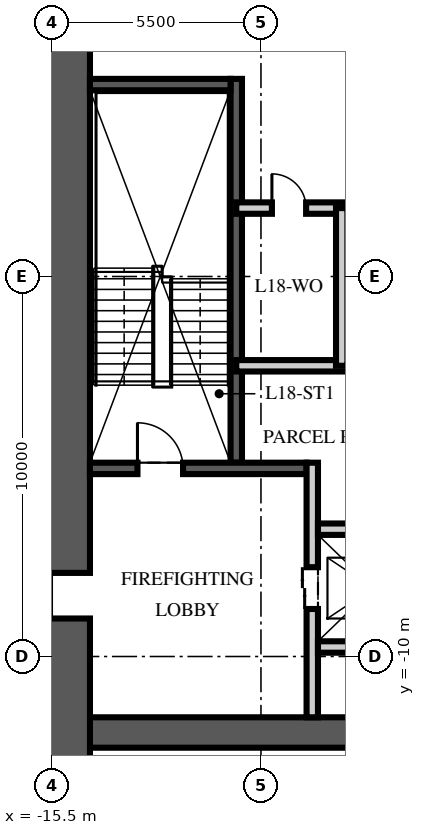
"""IFC4 building model, lengths in metres.
Left out: names, types, materials, properties, quantities, classifications, styles, units other than length and angle.
Written with IfcOpenShell. Run it as: python <this file> out.ifc"""

import sys

from ifc_helpers import new_model, si_unit, direction, frame, frame_2d, origin, place, context, subcontext, project, spatial, rectangle, extrude, element, fill, save


model = new_model("IFC4")
c1 = context("Model", 3, precision=1e-05, world=origin(), true_north=direction((0.0, 1.0)))
c2 = subcontext(c1, "Body", "Model", "MODEL_VIEW")
j1 = project(units=[si_unit("LENGTHUNIT", "METRE"), si_unit("PLANEANGLEUNIT", "RADIAN")], contexts=[c1])
p1 = place(None, origin())
s1 = spatial("IfcSite", under=j1, at=p1, CompositionType="ELEMENT")
p2 = place(p1, origin())
s2 = spatial("IfcBuilding", under=s1, at=p2, CompositionType="ELEMENT")
p3 = place(p2, frame((0.0, 0.0, 73.5)))
s3 = spatial("IfcBuildingStorey", under=s2, at=p3, CompositionType="ELEMENT", Elevation=73.5)
p4 = place(p3, frame((-15.5, -12.0, -0.25), z_axis=(0.0, 0.0, 1.0), x_axis=(1.0, 0.0, 0.0)))
e1 = element("IfcWall", 1, at=p4, inside=s3, PredefinedType="SHEAR", context=c2, shape_type="SweptSolid", body=[
    extrude(rectangle(XDim=31.0, YDim=0.8, at=frame_2d((15.5, 0.0))), origin(), (0.0, 0.0, 1.0), 3.75),
])
p5 = place(p3, frame((-15.5, -15.5, -0.25), z_axis=(0.0, 0.0, 1.0), x_axis=(0.0, 1.0, 0.0)))
e2 = element("IfcWall", 2, at=p5, inside=s3, PredefinedType="SHEAR", context=c2, shape_type="SweptSolid", body=[
    extrude(rectangle(XDim=31.0, YDim=2.0, at=frame_2d((15.5, 0.0))), origin(), (0.0, 0.0, 1.0), 3.75),
])
p6 = place(p5, frame((6.5, 0.0, 0.25)))
e3 = element("IfcOpeningElement", 3, at=p6, cuts=e2, PredefinedType="OPENING", context=c2, shape_type="SweptSolid", body=[
    extrude(rectangle(XDim=1.2, YDim=2.1, at=frame_2d((0.6, 1.05))), frame((0.0, 1.01, 0.0), z_axis=(0.0, -1.0, 0.0), x_axis=(1.0, 0.0, 0.0)), (0.0, 0.0, 1.0), 2.02),
])
p7 = place(p5, frame((23.0, 0.0, 0.25)))
e4 = element("IfcOpeningElement", 4, at=p7, cuts=e2, PredefinedType="OPENING", context=c2, shape_type="SweptSolid", body=[
    extrude(rectangle(XDim=1.8, YDim=2.1, at=frame_2d((0.9, 1.05))), frame((0.0, 1.01, 0.0), z_axis=(0.0, -1.0, 0.0), x_axis=(1.0, 0.0, 0.0)), (0.0, 0.0, 1.0), 2.02),
])
p8 = place(p3, frame((-10.65, -4.9, 0.0), z_axis=(0.0, 0.0, 1.0), x_axis=(0.0, 1.0, 0.0)))
e5 = element("IfcWall", 5, at=p8, inside=s3, PredefinedType="SOLIDWALL", context=c2, shape_type="SweptSolid", body=[
    extrude(rectangle(XDim=10.1, YDim=0.3, at=frame_2d((5.05, 0.0))), origin(), (0.0, 0.0, 1.0), 3.5),
])
p9 = place(p3, frame((-14.5, -5.05, 0.0), z_axis=(0.0, 0.0, 1.0), x_axis=(1.0, 0.0, 0.0)))
e6 = element("IfcWall", 6, at=p9, inside=s3, PredefinedType="SOLIDWALL", context=c2, shape_type="SweptSolid", body=[
    extrude(rectangle(XDim=5.7, YDim=0.3, at=frame_2d((2.85, 0.0))), origin(), (0.0, 0.0, 1.0), 3.5),
])
p10 = place(p9, frame((1.25, 0.0, 0.0)))
e7 = element("IfcOpeningElement", 7, at=p10, cuts=e6, PredefinedType="OPENING", context=c2, shape_type="SweptSolid", body=[
    extrude(rectangle(XDim=1.2, YDim=2.1, at=frame_2d((0.6, 1.05))), frame((0.0, 0.16, 0.0), z_axis=(0.0, -1.0, 0.0), x_axis=(1.0, 0.0, 0.0)), (0.0, 0.0, 1.0), 0.32),
])
p11 = place(p3, frame((-14.5, 5.05, 0.0), z_axis=(0.0, 0.0, 1.0), x_axis=(1.0, 0.0, 0.0)))
e8 = element("IfcWall", 8, at=p11, inside=s3, PredefinedType="SOLIDWALL", context=c2, shape_type="SweptSolid", body=[
    extrude(rectangle(XDim=3.7, YDim=0.3, at=frame_2d((1.85, 0.0))), origin(), (0.0, 0.0, 1.0), 3.5),
])
p12 = place(p3, frame((-8.65, -11.6, 0.0), z_axis=(0.0, 0.0, 1.0), x_axis=(0.0, 1.0, 0.0)))
e9 = element("IfcWall", 9, at=p12, inside=s3, PredefinedType="PARTITIONING", context=c2, shape_type="SweptSolid", body=[
    extrude(rectangle(XDim=6.7, YDim=0.3, at=frame_2d((3.35, 0.0))), origin(), (0.0, 0.0, 1.0), 3.5),
])
p13 = place(p12, frame((2.85, 0.0, 0.0)))
e10 = element("IfcOpeningElement", 10, at=p13, cuts=e9, PredefinedType="OPENING", context=c2, shape_type="SweptSolid", body=[
    extrude(rectangle(XDim=1.1, YDim=2.1, at=frame_2d((0.55, 1.05))), frame((0.0, 0.16, 0.0), z_axis=(0.0, -1.0, 0.0), x_axis=(1.0, 0.0, 0.0)), (0.0, 0.0, 1.0), 0.32),
])
p14 = place(p3, frame((-8.5, -6.65, 0.0), z_axis=(0.0, 0.0, 1.0), x_axis=(1.0, 0.0, 0.0)))
e11 = element("IfcWall", 11, at=p14, inside=s3, PredefinedType="PARTITIONING", context=c2, shape_type="SweptSolid", body=[
    extrude(rectangle(XDim=17.0, YDim=0.3, at=frame_2d((8.5, 0.0))), origin(), (0.0, 0.0, 1.0), 3.5),
])
p15 = place(p14, frame((7.8, 0.0, 0.0)))
e12 = element("IfcOpeningElement", 12, at=p15, cuts=e11, PredefinedType="OPENING", context=c2, shape_type="SweptSolid", body=[
    extrude(rectangle(XDim=1.3, YDim=2.4, at=frame_2d((0.65, 1.2))), frame((0.0, 0.16, 0.0), z_axis=(0.0, -1.0, 0.0), x_axis=(1.0, 0.0, 0.0)), (0.0, 0.0, 1.0), 0.32),
])
p16 = place(p14, frame((5.65, 0.0, 0.0)))
e13 = element("IfcOpeningElement", 13, at=p16, cuts=e11, PredefinedType="OPENING", context=c2, shape_type="SweptSolid", body=[
    extrude(rectangle(XDim=0.9, YDim=2.1, at=frame_2d((0.45, 1.05))), frame((0.0, 0.16, 0.0), z_axis=(0.0, -1.0, 0.0), x_axis=(1.0, 0.0, 0.0)), (0.0, 0.0, 1.0), 0.32),
])
p17 = place(p14, frame((10.4, 0.0, 0.0)))
e14 = element("IfcOpeningElement", 14, at=p17, cuts=e11, PredefinedType="OPENING", context=c2, shape_type="SweptSolid", body=[
    extrude(rectangle(XDim=0.9, YDim=2.1, at=frame_2d((0.45, 1.05))), frame((0.0, 0.16, 0.0), z_axis=(0.0, -1.0, 0.0), x_axis=(1.0, 0.0, 0.0)), (0.0, 0.0, 1.0), 0.32),
])
p18 = place(p3, frame((-8.5, -9.75, 0.0), z_axis=(0.0, 0.0, 1.0), x_axis=(1.0, 0.0, 0.0)))
e15 = element("IfcWall", 15, at=p18, inside=s3, PredefinedType="PARTITIONING", context=c2, shape_type="SweptSolid", body=[
    extrude(rectangle(XDim=2.9, YDim=0.3, at=frame_2d((1.45, 0.0))), origin(), (0.0, 0.0, 1.0), 3.5),
])
p19 = place(p3, frame((-10.65, 1.8, 0.0), z_axis=(0.0, 0.0, 1.0), x_axis=(1.0, 0.0, 0.0)))
e16 = element("IfcWall", 16, at=p19, inside=s3, PredefinedType="PARTITIONING", context=c2, shape_type="SweptSolid", body=[
    extrude(rectangle(XDim=21.3, YDim=0.3, at=frame_2d((10.65, 0.0))), origin(), (0.0, 0.0, 1.0), 3.5),
])
p20 = place(p19, frame((10.05, 0.0, 0.0)))
e17 = element("IfcOpeningElement", 17, at=p20, cuts=e16, PredefinedType="OPENING", context=c2, shape_type="SweptSolid", body=[
    extrude(rectangle(XDim=1.2, YDim=2.1, at=frame_2d((0.6, 1.05))), frame((0.0, 0.16, 0.0), z_axis=(0.0, -1.0, 0.0), x_axis=(1.0, 0.0, 0.0)), (0.0, 0.0, 1.0), 0.32),
])
p21 = place(p19, frame((0.938, 0.0, 0.0)))
e18 = element("IfcOpeningElement", 18, at=p21, cuts=e16, PredefinedType="OPENING", context=c2, shape_type="SweptSolid", body=[
    extrude(rectangle(XDim=0.9, YDim=2.1, at=frame_2d((0.45, 1.05))), frame((0.0, 0.16, 0.0), z_axis=(0.0, -1.0, 0.0), x_axis=(1.0, 0.0, 0.0)), (0.0, 0.0, 1.0), 0.32),
])
p22 = place(p3, frame((-10.65, -2.35, 0.0), z_axis=(0.0, 0.0, 1.0), x_axis=(1.0, 0.0, 0.0)))
e19 = element("IfcWall", 19, at=p22, inside=s3, PredefinedType="PARTITIONING", context=c2, shape_type="SweptSolid", body=[
    extrude(rectangle(XDim=5.55, YDim=0.3, at=frame_2d((2.775, 0.0))), origin(), (0.0, 0.0, 1.0), 3.5),
])
p23 = place(p3, frame((-7.875, -2.35, 0.0), z_axis=(0.0, 0.0, 1.0), x_axis=(0.0, 1.0, 0.0)))
e20 = element("IfcWall", 20, at=p23, inside=s3, PredefinedType="PARTITIONING", context=c2, shape_type="SweptSolid", body=[
    extrude(rectangle(XDim=4.15, YDim=0.3, at=frame_2d((2.075, 0.0))), origin(), (0.0, 0.0, 1.0), 3.5),
])
p24 = place(p10, origin())
e21 = element("IfcDoor", 21, at=p24, inside=s3, OperationType="SINGLE_SWING_LEFT", PredefinedType="DOOR", context=c2, shape_type="SweptSolid", body=[
    extrude(rectangle(XDim=1.2, YDim=2.1, at=frame_2d((0.6, 1.05))), frame((0.0, 0.025, 0.0), z_axis=(0.0, -1.0, 0.0), x_axis=(1.0, 0.0, 0.0)), (0.0, 0.0, 1.0), 0.05),
])
fill(e7, e21)
p25 = place(p6, origin())
e22 = element("IfcDoor", 22, at=p25, inside=s3, OperationType="SINGLE_SWING_LEFT", PredefinedType="DOOR", context=c2, shape_type="SweptSolid", body=[
    extrude(rectangle(XDim=1.2, YDim=2.1, at=frame_2d((0.6, 1.05))), frame((0.0, 0.025, 0.0), z_axis=(0.0, -1.0, 0.0), x_axis=(1.0, 0.0, 0.0)), (0.0, 0.0, 1.0), 0.05),
])
fill(e3, e22)
p26 = place(p13, origin())
e23 = element("IfcDoor", 23, at=p26, inside=s3, OperationType="DOUBLE_DOOR_SLIDING", PredefinedType="DOOR", context=c2, shape_type="SweptSolid", body=[
    extrude(rectangle(XDim=1.1, YDim=2.1, at=frame_2d((0.55, 1.05))), frame((0.0, 0.025, 0.0), z_axis=(0.0, -1.0, 0.0), x_axis=(1.0, 0.0, 0.0)), (0.0, 0.0, 1.0), 0.05),
])
fill(e10, e23)
p27 = place(p21, origin())
e24 = element("IfcDoor", 24, at=p27, inside=s3, OperationType="SINGLE_SWING_LEFT", PredefinedType="DOOR", context=c2, shape_type="SweptSolid", body=[
    extrude(rectangle(XDim=0.9, YDim=2.1, at=frame_2d((0.45, 1.05))), frame((0.0, 0.025, 0.0), z_axis=(0.0, -1.0, 0.0), x_axis=(1.0, 0.0, 0.0)), (0.0, 0.0, 1.0), 0.05),
])
fill(e18, e24)
save(model, sys.argv[1])
